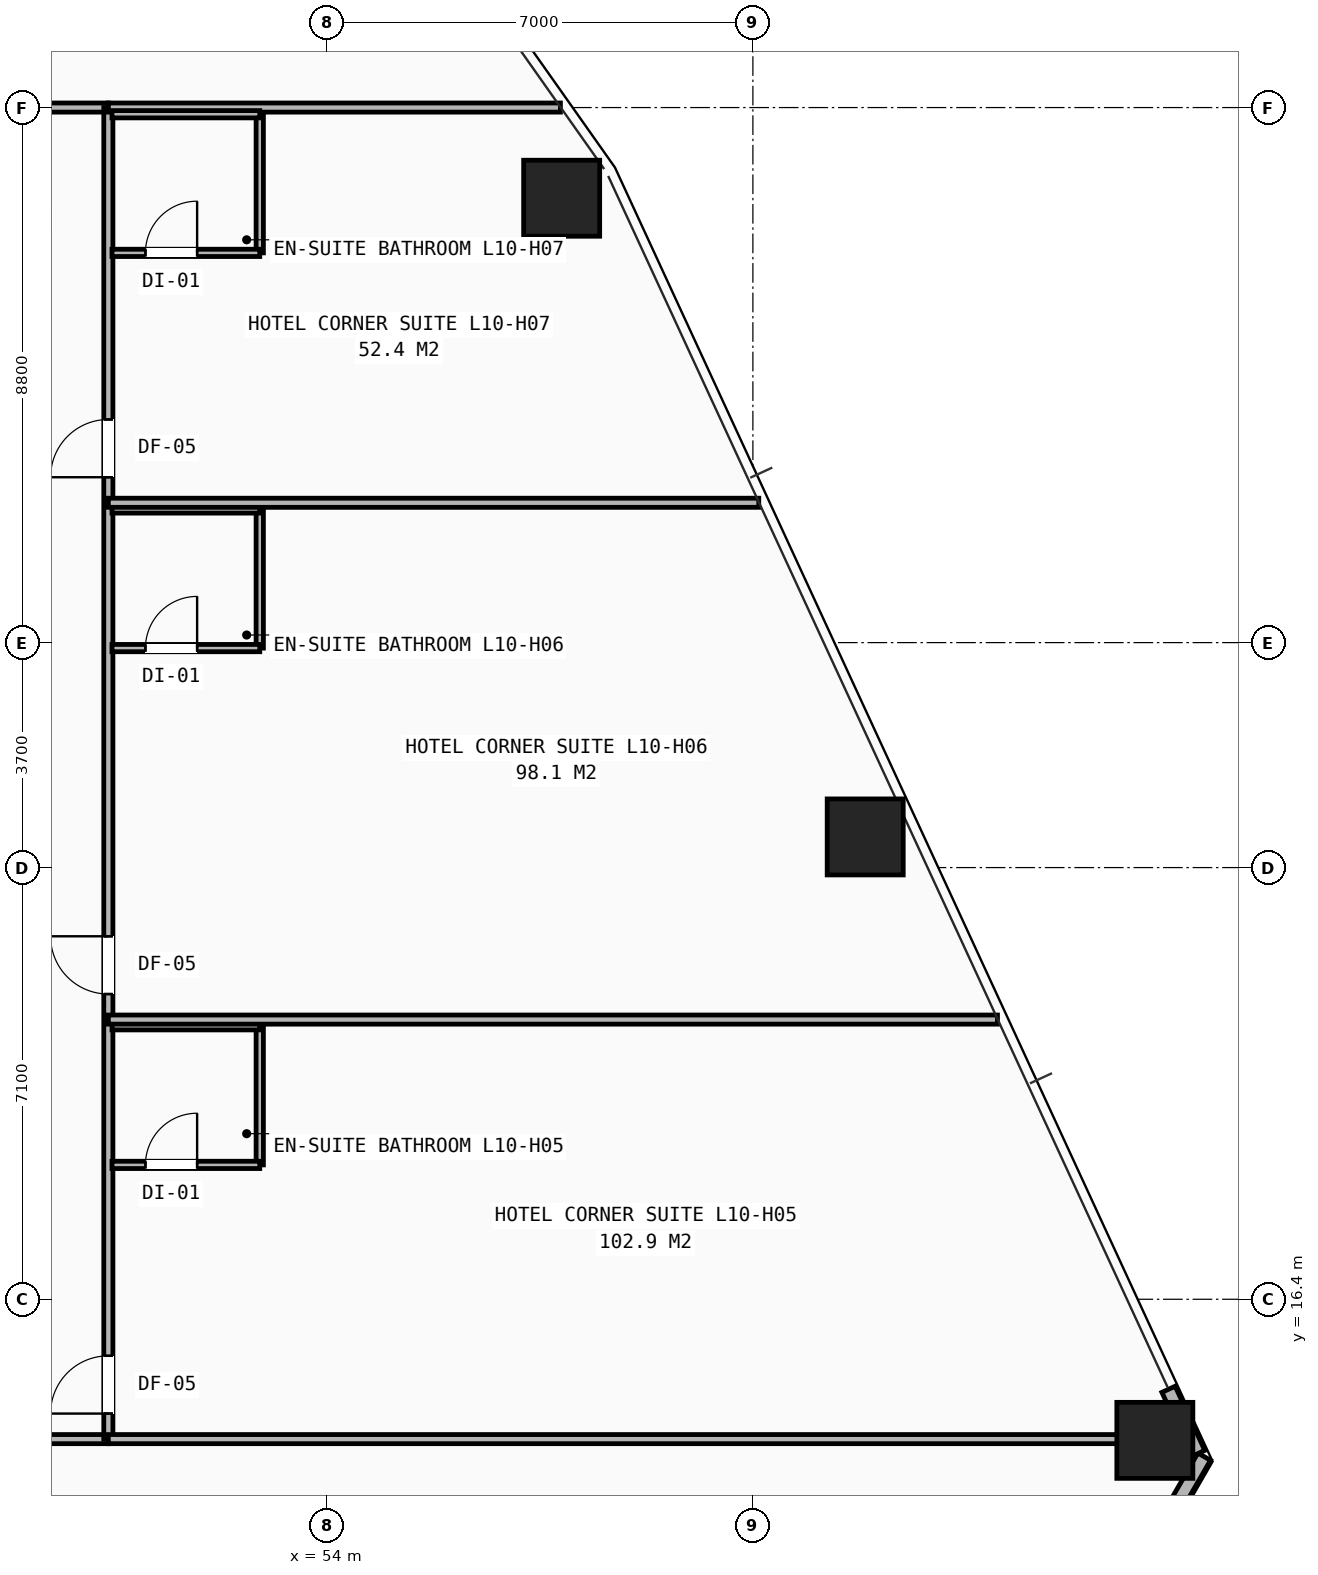
"""IFC4 building model, lengths in metres.
Left out: names, types, materials, properties, quantities, classifications, styles, units other than length and angle.
Written with IfcOpenShell. Run it as: python <this file> out.ifc"""

import sys

from ifc_helpers import new_model, si_unit, direction, frame, frame_2d, origin, origin_2d, place, context, subcontext, project, spatial, rectangle, hollow_rectangle, extrude, element, fill, save


model = new_model("IFC4")
c1 = context("Model", 3, precision=1e-05, world=origin(), true_north=direction((0.0, 1.0)))
c2 = subcontext(c1, "Body", "Model", "MODEL_VIEW")
j1 = project(units=[si_unit("LENGTHUNIT", "METRE"), si_unit("PLANEANGLEUNIT", "RADIAN")], contexts=[c1])
p1 = place(None, origin())
s1 = spatial("IfcSite", under=j1, at=p1, CompositionType="ELEMENT")
p2 = place(p1, origin())
s2 = spatial("IfcBuilding", under=s1, at=p2, CompositionType="ELEMENT")
p3 = place(p2, frame((0.0, 0.0, 40.0)))
s3 = spatial("IfcBuildingStorey", under=s2, at=p3, CompositionType="ELEMENT", Elevation=40.0)
for number, where, z_axis, x_axis in (
    (1, (67.611, 14.08, 0.0), (0.0, 0.0, 1.0), (1.0, 0.0, 0.0)),
    (2, (62.847, 24.004, 0.0), (0.0, 0.0, 1.0), (1.0, 0.0, 0.0)),
    (3, (57.855, 34.509, 0.0), (0.0, 0.0, 1.0), (1.0, 0.0, 0.0)),
):
    element("IfcColumn", number, at=place(p3, frame(where, z_axis=z_axis, x_axis=x_axis)), inside=s3, PredefinedType="COLUMN", context=c2, shape_type="SweptSolid", body=[
        extrude(hollow_rectangle(XDim=1.25, YDim=1.25, WallThickness=0.08, at=origin_2d()), origin(), (0.0, 0.0, 1.0), 3.2),
    ])
p4 = place(p3, frame((68.422, 13.811, 0.0), z_axis=(0.0, 0.0, 1.0), x_axis=(-0.500011568057, -0.866018724861, 0.0)))
e4 = element("IfcWall", 4, at=p4, inside=s3, PredefinedType="SHEAR", context=c2, shape_type="SweptSolid", body=[
    extrude(rectangle(XDim=10.428, YDim=0.24, at=frame_2d((5.214, 0.0))), origin(), (0.0, 0.0, 1.0), 2.263),
])
p5 = place(p3, frame((68.323, 13.864, 0.0), z_axis=(0.0, 0.0, 1.0), x_axis=(-0.419364442242, 0.907817968859, 0.0)))
e5 = element("IfcWall", 5, at=p5, inside=s3, PredefinedType="SHEAR", context=c2, shape_type="SweptSolid", body=[
    extrude(rectangle(XDim=1.163, YDim=0.24, at=frame_2d((0.581, 0.0))), origin(), (0.0, 0.0, 1.0), 2.263),
])
p6 = place(p3, frame((29.6, 14.1, 0.0), z_axis=(0.0, 0.0, 1.0), x_axis=(1.0, 0.0, 0.0)))
e6 = element("IfcWall", 6, at=p6, inside=s3, PredefinedType="PARTITIONING", context=c2, shape_type="SweptSolid", body=[
    extrude(rectangle(XDim=20.8, YDim=0.15, at=frame_2d((10.4, 0.0))), origin(), (0.0, 0.0, 1.0), 2.431),
])
p7 = place(p6, frame((0.57, 0.0, 0.0)))
e7 = element("IfcOpeningElement", 7, at=p7, cuts=e6, PredefinedType="OPENING", context=c2, shape_type="SweptSolid", body=[
    extrude(rectangle(XDim=0.95, YDim=2.1, at=frame_2d((0.475, 1.05))), frame((0.0, 0.085, 0.0), z_axis=(0.0, -1.0, 0.0), x_axis=(1.0, 0.0, 0.0)), (0.0, 0.0, 1.0), 0.17),
])
p8 = place(p6, frame((10.32, 0.0, 0.0)))
e8 = element("IfcOpeningElement", 8, at=p8, cuts=e6, PredefinedType="OPENING", context=c2, shape_type="SweptSolid", body=[
    extrude(rectangle(XDim=0.95, YDim=2.1, at=frame_2d((0.475, 1.05))), frame((0.0, 0.085, 0.0), z_axis=(0.0, -1.0, 0.0), x_axis=(1.0, 0.0, 0.0)), (0.0, 0.0, 1.0), 0.17),
])
p9 = place(p3, frame((40.75, 36.0, 0.0), z_axis=(0.0, 0.0, 1.0), x_axis=(1.0, 0.0, 0.0)))
e9 = element("IfcWall", 9, at=p9, inside=s3, PredefinedType="PARTITIONING", context=c2, shape_type="SweptSolid", body=[
    extrude(rectangle(XDim=9.65, YDim=0.15, at=frame_2d((4.825, 0.0))), origin(), (0.0, 0.0, 1.0), 2.513),
])
p10 = place(p9, frame((0.2, 0.0, 0.0)))
e10 = element("IfcOpeningElement", 10, at=p10, cuts=e9, PredefinedType="OPENING", context=c2, shape_type="SweptSolid", body=[
    extrude(rectangle(XDim=0.95, YDim=2.1, at=frame_2d((0.475, 1.05))), frame((0.0, 0.085, 0.0), z_axis=(0.0, -1.0, 0.0), x_axis=(1.0, 0.0, 0.0)), (0.0, 0.0, 1.0), 0.17),
])
p11 = place(p3, frame((50.4, 14.1, 0.0), z_axis=(0.0, 0.0, 1.0), x_axis=(0.0, 1.0, 0.0)))
e11 = element("IfcWall", 11, at=p11, inside=s3, PredefinedType="PARTITIONING", context=c2, shape_type="SweptSolid", body=[
    extrude(rectangle(XDim=21.9, YDim=0.15, at=frame_2d((10.95, 0.0))), origin(), (0.0, 0.0, 1.0), 2.431),
])
p12 = place(p11, frame((0.42, 0.0, 0.0)))
e12 = element("IfcOpeningElement", 12, at=p12, cuts=e11, PredefinedType="OPENING", context=c2, shape_type="SweptSolid", body=[
    extrude(rectangle(XDim=0.95, YDim=2.1, at=frame_2d((0.475, 1.05))), frame((0.0, 0.085, 0.0), z_axis=(0.0, -1.0, 0.0), x_axis=(1.0, 0.0, 0.0)), (0.0, 0.0, 1.0), 0.17),
])
p13 = place(p11, frame((7.32, 0.0, 0.0)))
e13 = element("IfcOpeningElement", 13, at=p13, cuts=e11, PredefinedType="OPENING", context=c2, shape_type="SweptSolid", body=[
    extrude(rectangle(XDim=0.95, YDim=2.1, at=frame_2d((0.475, 1.05))), frame((0.0, 0.085, 0.0), z_axis=(0.0, -1.0, 0.0), x_axis=(1.0, 0.0, 0.0)), (0.0, 0.0, 1.0), 0.17),
])
p14 = place(p11, frame((15.82, 0.0, 0.0)))
e14 = element("IfcOpeningElement", 14, at=p14, cuts=e11, PredefinedType="OPENING", context=c2, shape_type="SweptSolid", body=[
    extrude(rectangle(XDim=0.95, YDim=2.1, at=frame_2d((0.475, 1.05))), frame((0.0, 0.085, 0.0), z_axis=(0.0, -1.0, 0.0), x_axis=(1.0, 0.0, 0.0)), (0.0, 0.0, 1.0), 0.17),
])
p15 = place(p3, frame((50.4, 14.1, 0.0), z_axis=(0.0, 0.0, 1.0), x_axis=(1.0, 0.0, 0.0)))
e15 = element("IfcWall", 15, at=p15, inside=s3, PredefinedType="PARTITIONING", context=c2, shape_type="SweptSolid", body=[
    extrude(rectangle(XDim=17.809, YDim=0.15, at=frame_2d((8.904, 0.0))), origin(), (0.0, 0.0, 1.0), 2.268),
])
p16 = place(p3, frame((50.4, 36.0, 0.0), z_axis=(0.0, 0.0, 1.0), x_axis=(1.0, 0.0, 0.0)))
e16 = element("IfcWall", 16, at=p16, inside=s3, PredefinedType="PARTITIONING", context=c2, shape_type="SweptSolid", body=[
    extrude(rectangle(XDim=7.434, YDim=0.15, at=frame_2d((3.717, 0.0))), origin(), (0.0, 0.0, 1.0), 2.268),
])
p17 = place(p3, frame((52.89, 18.61, 0.0), z_axis=(0.0, 0.0, 1.0), x_axis=(0.0, 1.0, 0.0)))
e17 = element("IfcWall", 17, at=p17, inside=s3, PredefinedType="PARTITIONING", context=c2, shape_type="SweptSolid", body=[
    extrude(rectangle(XDim=2.28, YDim=0.12, at=frame_2d((1.14, 0.0))), origin(), (0.0, 0.0, 1.0), 2.98),
])
p18 = place(p3, frame((50.46, 18.61, 0.0), z_axis=(0.0, 0.0, 1.0), x_axis=(1.0, 0.0, 0.0)))
e18 = element("IfcWall", 18, at=p18, inside=s3, PredefinedType="PARTITIONING", context=c2, shape_type="SweptSolid", body=[
    extrude(rectangle(XDim=2.43, YDim=0.12, at=frame_2d((1.215, 0.0))), origin(), (0.0, 0.0, 1.0), 2.98),
])
p19 = place(p18, frame((0.55, 0.0, 0.0)))
e19 = element("IfcOpeningElement", 19, at=p19, cuts=e18, PredefinedType="OPENING", context=c2, shape_type="SweptSolid", body=[
    extrude(rectangle(XDim=0.85, YDim=2.05, at=frame_2d((0.425, 1.025))), frame((0.0, 0.07, 0.0), z_axis=(0.0, -1.0, 0.0), x_axis=(1.0, 0.0, 0.0)), (0.0, 0.0, 1.0), 0.14),
])
p20 = place(p3, frame((50.46, 20.89, 0.0), z_axis=(0.0, 0.0, 1.0), x_axis=(1.0, 0.0, 0.0)))
e20 = element("IfcWall", 20, at=p20, inside=s3, PredefinedType="PARTITIONING", context=c2, shape_type="SweptSolid", body=[
    extrude(rectangle(XDim=2.43, YDim=0.12, at=frame_2d((1.215, 0.0))), origin(), (0.0, 0.0, 1.0), 2.98),
])
p21 = place(p3, frame((50.4, 21.0, 0.0), z_axis=(0.0, 0.0, 1.0), x_axis=(1.0, 0.0, 0.0)))
e21 = element("IfcWall", 21, at=p21, inside=s3, PredefinedType="PARTITIONING", context=c2, shape_type="SweptSolid", body=[
    extrude(rectangle(XDim=14.622, YDim=0.15, at=frame_2d((7.311, 0.0))), origin(), (0.0, 0.0, 1.0), 2.268),
])
p22 = place(p3, frame((52.89, 27.11, 0.0), z_axis=(0.0, 0.0, 1.0), x_axis=(0.0, 1.0, 0.0)))
e22 = element("IfcWall", 22, at=p22, inside=s3, PredefinedType="PARTITIONING", context=c2, shape_type="SweptSolid", body=[
    extrude(rectangle(XDim=2.28, YDim=0.12, at=frame_2d((1.14, 0.0))), origin(), (0.0, 0.0, 1.0), 2.98),
])
p23 = place(p3, frame((50.46, 27.11, 0.0), z_axis=(0.0, 0.0, 1.0), x_axis=(1.0, 0.0, 0.0)))
e23 = element("IfcWall", 23, at=p23, inside=s3, PredefinedType="PARTITIONING", context=c2, shape_type="SweptSolid", body=[
    extrude(rectangle(XDim=2.43, YDim=0.12, at=frame_2d((1.215, 0.0))), origin(), (0.0, 0.0, 1.0), 2.98),
])
p24 = place(p23, frame((0.55, 0.0, 0.0)))
e24 = element("IfcOpeningElement", 24, at=p24, cuts=e23, PredefinedType="OPENING", context=c2, shape_type="SweptSolid", body=[
    extrude(rectangle(XDim=0.85, YDim=2.05, at=frame_2d((0.425, 1.025))), frame((0.0, 0.07, 0.0), z_axis=(0.0, -1.0, 0.0), x_axis=(1.0, 0.0, 0.0)), (0.0, 0.0, 1.0), 0.14),
])
p25 = place(p3, frame((50.46, 29.39, 0.0), z_axis=(0.0, 0.0, 1.0), x_axis=(1.0, 0.0, 0.0)))
e25 = element("IfcWall", 25, at=p25, inside=s3, PredefinedType="PARTITIONING", context=c2, shape_type="SweptSolid", body=[
    extrude(rectangle(XDim=2.43, YDim=0.12, at=frame_2d((1.215, 0.0))), origin(), (0.0, 0.0, 1.0), 2.98),
])
p26 = place(p3, frame((50.4, 29.5, 0.0), z_axis=(0.0, 0.0, 1.0), x_axis=(1.0, 0.0, 0.0)))
e26 = element("IfcWall", 26, at=p26, inside=s3, PredefinedType="PARTITIONING", context=c2, shape_type="SweptSolid", body=[
    extrude(rectangle(XDim=10.697, YDim=0.15, at=frame_2d((5.348, 0.0))), origin(), (0.0, 0.0, 1.0), 2.268),
])
p27 = place(p3, frame((52.89, 33.61, 0.0), z_axis=(0.0, 0.0, 1.0), x_axis=(0.0, 1.0, 0.0)))
e27 = element("IfcWall", 27, at=p27, inside=s3, PredefinedType="PARTITIONING", context=c2, shape_type="SweptSolid", body=[
    extrude(rectangle(XDim=2.28, YDim=0.12, at=frame_2d((1.14, 0.0))), origin(), (0.0, 0.0, 1.0), 2.98),
])
p28 = place(p3, frame((50.46, 33.61, 0.0), z_axis=(0.0, 0.0, 1.0), x_axis=(1.0, 0.0, 0.0)))
e28 = element("IfcWall", 28, at=p28, inside=s3, PredefinedType="PARTITIONING", context=c2, shape_type="SweptSolid", body=[
    extrude(rectangle(XDim=2.43, YDim=0.12, at=frame_2d((1.215, 0.0))), origin(), (0.0, 0.0, 1.0), 2.513),
])
p29 = place(p28, frame((0.55, 0.0, 0.0)))
e29 = element("IfcOpeningElement", 29, at=p29, cuts=e28, PredefinedType="OPENING", context=c2, shape_type="SweptSolid", body=[
    extrude(rectangle(XDim=0.85, YDim=2.05, at=frame_2d((0.425, 1.025))), frame((0.0, 0.07, 0.0), z_axis=(0.0, -1.0, 0.0), x_axis=(1.0, 0.0, 0.0)), (0.0, 0.0, 1.0), 0.14),
])
p30 = place(p3, frame((50.46, 35.89, 0.0), z_axis=(0.0, 0.0, 1.0), x_axis=(1.0, 0.0, 0.0)))
e30 = element("IfcWall", 30, at=p30, inside=s3, PredefinedType="PARTITIONING", context=c2, shape_type="SweptSolid", body=[
    extrude(rectangle(XDim=2.43, YDim=0.12, at=frame_2d((1.215, 0.0))), origin(), (0.0, 0.0, 1.0), 2.513),
])
p31 = place(p12, origin())
e31 = element("IfcDoor", 31, at=p31, inside=s3, OperationType="SINGLE_SWING_LEFT", PredefinedType="DOOR", context=c2, shape_type="SweptSolid", body=[
    extrude(rectangle(XDim=0.95, YDim=2.1, at=frame_2d((0.475, 1.05))), frame((0.0, 0.025, 0.0), z_axis=(0.0, -1.0, 0.0), x_axis=(1.0, 0.0, 0.0)), (0.0, 0.0, 1.0), 0.05),
])
fill(e12, e31)
p32 = place(p19, origin())
e32 = element("IfcDoor", 32, at=p32, inside=s3, OperationType="SINGLE_SWING_RIGHT", PredefinedType="DOOR", context=c2, shape_type="SweptSolid", body=[
    extrude(rectangle(XDim=0.85, YDim=2.05, at=frame_2d((0.425, 1.025))), frame((0.0, 0.025, 0.0), z_axis=(0.0, -1.0, 0.0), x_axis=(1.0, 0.0, 0.0)), (0.0, 0.0, 1.0), 0.05),
])
fill(e19, e32)
p33 = place(p13, origin())
e33 = element("IfcDoor", 33, at=p33, inside=s3, OperationType="SINGLE_SWING_RIGHT", PredefinedType="DOOR", context=c2, shape_type="SweptSolid", body=[
    extrude(rectangle(XDim=0.95, YDim=2.1, at=frame_2d((0.475, 1.05))), frame((0.0, 0.025, 0.0), z_axis=(0.0, -1.0, 0.0), x_axis=(1.0, 0.0, 0.0)), (0.0, 0.0, 1.0), 0.05),
])
fill(e13, e33)
p34 = place(p24, origin())
e34 = element("IfcDoor", 34, at=p34, inside=s3, OperationType="SINGLE_SWING_RIGHT", PredefinedType="DOOR", context=c2, shape_type="SweptSolid", body=[
    extrude(rectangle(XDim=0.85, YDim=2.05, at=frame_2d((0.425, 1.025))), frame((0.0, 0.025, 0.0), z_axis=(0.0, -1.0, 0.0), x_axis=(1.0, 0.0, 0.0)), (0.0, 0.0, 1.0), 0.05),
])
fill(e24, e34)
p35 = place(p14, origin())
e35 = element("IfcDoor", 35, at=p35, inside=s3, OperationType="SINGLE_SWING_LEFT", PredefinedType="DOOR", context=c2, shape_type="SweptSolid", body=[
    extrude(rectangle(XDim=0.95, YDim=2.1, at=frame_2d((0.475, 1.05))), frame((0.0, 0.025, 0.0), z_axis=(0.0, -1.0, 0.0), x_axis=(1.0, 0.0, 0.0)), (0.0, 0.0, 1.0), 0.05),
])
fill(e14, e35)
p36 = place(p29, origin())
e36 = element("IfcDoor", 36, at=p36, inside=s3, OperationType="SINGLE_SWING_RIGHT", PredefinedType="DOOR", context=c2, shape_type="SweptSolid", body=[
    extrude(rectangle(XDim=0.85, YDim=2.05, at=frame_2d((0.425, 1.025))), frame((0.0, 0.025, 0.0), z_axis=(0.0, -1.0, 0.0), x_axis=(1.0, 0.0, 0.0)), (0.0, 0.0, 1.0), 0.05),
])
fill(e29, e36)
save(model, sys.argv[1])
